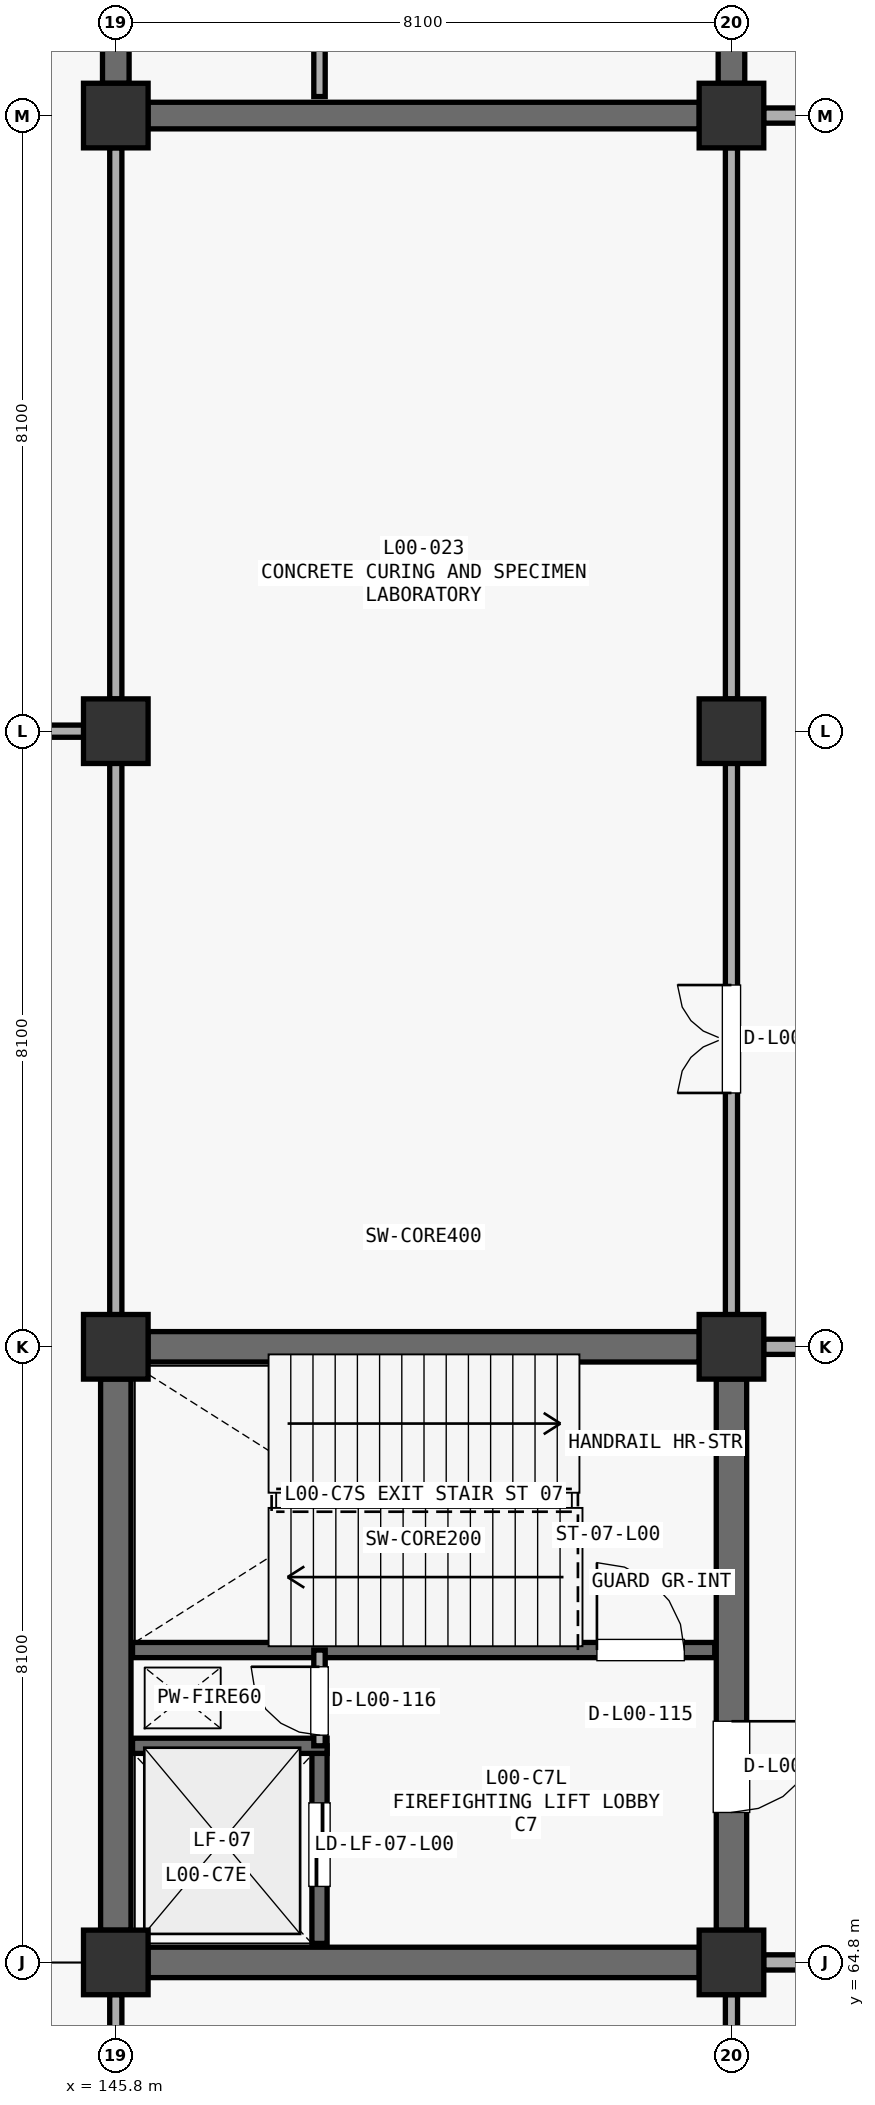
"""IFC4 building model, lengths in metres.
Left out: names, types, materials, properties, quantities, classifications, styles, units other than length and angle.
Written with IfcOpenShell. Run it as: python <this file> out.ifc"""

import sys

from ifc_helpers import new_model, si_unit, direction, frame, frame_2d, origin, origin_2d, place, context, subcontext, project, spatial, rectangle, extrude, element, fill, save


model = new_model("IFC4")
c1 = context("Model", 3, precision=1e-05, world=origin(), true_north=direction((0.0, 1.0)))
c2 = subcontext(c1, "Body", "Model", "MODEL_VIEW")
j1 = project(units=[si_unit("LENGTHUNIT", "METRE"), si_unit("PLANEANGLEUNIT", "RADIAN")], contexts=[c1])
p1 = place(None, origin())
s1 = spatial("IfcSite", under=j1, at=p1, CompositionType="ELEMENT")
p2 = place(p1, origin())
s2 = spatial("IfcBuilding", under=s1, at=p2, CompositionType="ELEMENT")
p3 = place(p2, origin())
s3 = spatial("IfcBuildingStorey", under=s2, at=p3, CompositionType="ELEMENT", Elevation=0.0)
for number, where, z_axis, x_axis in (
    (1, (145.8, 64.8, 0.0), (0.0, 0.0, 1.0), (1.0, 0.0, 0.0)),
    (2, (145.8, 72.9, 0.0), (0.0, 0.0, 1.0), (1.0, 0.0, 0.0)),
    (3, (145.8, 81.0, 0.0), (0.0, 0.0, 1.0), (1.0, 0.0, 0.0)),
    (4, (145.8, 89.1, 0.0), (0.0, 0.0, 1.0), (1.0, 0.0, 0.0)),
    (5, (153.9, 64.8, 0.0), (0.0, 0.0, 1.0), (1.0, 0.0, 0.0)),
    (6, (153.9, 72.9, 0.0), (0.0, 0.0, 1.0), (1.0, 0.0, 0.0)),
    (7, (153.9, 81.0, 0.0), (0.0, 0.0, 1.0), (1.0, 0.0, 0.0)),
    (8, (153.9, 89.1, 0.0), (0.0, 0.0, 1.0), (1.0, 0.0, 0.0)),
):
    element("IfcColumn", number, at=place(p3, frame(where, z_axis=z_axis, x_axis=x_axis)), inside=s3, PredefinedType="COLUMN", context=c2, shape_type="SweptSolid", body=[
        extrude(rectangle(XDim=0.85, YDim=0.85, at=origin_2d()), origin(), (0.0, 0.0, 1.0), 5.1),
    ])
for number, where, z_axis, x_axis in (
    (9, (146.223, 72.9, 0.0), (0.0, 0.0, 1.0), (1.0, 0.0, 0.0)),
    (10, (145.8, 65.223, 0.0), (0.0, 0.0, 1.0), (0.0, 1.0, 0.0)),
):
    element("IfcWall", number, at=place(p3, frame(where, z_axis=z_axis, x_axis=x_axis)), inside=s3, PredefinedType="SHEAR", context=c2, shape_type="SweptSolid", body=[
        extrude(rectangle(XDim=7.254, YDim=0.4, at=frame_2d((3.627, 0.0))), origin(), (0.0, 0.0, 1.0), 4.822),
    ])
p4 = place(p3, frame((153.9, 65.223, 0.0), z_axis=(0.0, 0.0, 1.0), x_axis=(0.0, 1.0, 0.0)))
e11 = element("IfcWall", 11, at=p4, inside=s3, PredefinedType="SHEAR", context=c2, shape_type="SweptSolid", body=[
    extrude(rectangle(XDim=7.254, YDim=0.4, at=frame_2d((3.627, 0.0))), origin(), (0.0, 0.0, 1.0), 4.822),
])
p5 = place(p4, frame((2.75, 0.0, 0.0), z_axis=(0.0, 0.0, 1.0), x_axis=(-1.0, 0.0, 0.0)))
e12 = element("IfcOpeningElement", 12, at=p5, cuts=e11, PredefinedType="OPENING", context=c2, shape_type="SweptSolid", body=[
    extrude(rectangle(XDim=1.2, YDim=2.2, at=frame_2d((0.6, 1.1))), frame((0.0, 0.21, 0.0), z_axis=(0.0, -1.0, 0.0), x_axis=(1.0, 0.0, 0.0)), (0.0, 0.0, 1.0), 0.42),
])
p6 = place(p3, frame((146.223, 64.8, 0.0), z_axis=(0.0, 0.0, 1.0), x_axis=(1.0, 0.0, 0.0)))
e13 = element("IfcWall", 13, at=p6, inside=s3, PredefinedType="SHEAR", context=c2, shape_type="SweptSolid", body=[
    extrude(rectangle(XDim=7.254, YDim=0.4, at=frame_2d((3.627, 0.0))), origin(), (0.0, 0.0, 1.0), 4.822),
])
p7 = place(p3, frame((146.02, 68.91, 0.0), z_axis=(0.0, 0.0, 1.0), x_axis=(1.0, 0.0, 0.0)))
e14 = element("IfcWall", 14, at=p7, inside=s3, PredefinedType="SHEAR", context=c2, shape_type="SweptSolid", body=[
    extrude(rectangle(XDim=7.66, YDim=0.2, at=frame_2d((3.83, 0.0))), origin(), (0.0, 0.0, 1.0), 4.822),
])
p8 = place(p7, frame((6.11, 0.0, 0.0)))
e15 = element("IfcOpeningElement", 15, at=p8, cuts=e14, PredefinedType="OPENING", context=c2, shape_type="SweptSolid", body=[
    extrude(rectangle(XDim=1.15, YDim=2.2, at=frame_2d((0.575, 1.1))), frame((0.0, 0.11, 0.0), z_axis=(0.0, -1.0, 0.0), x_axis=(1.0, 0.0, 0.0)), (0.0, 0.0, 1.0), 0.22),
])
p9 = place(p3, frame((148.48, 65.05, 0.0), z_axis=(0.0, 0.0, 1.0), x_axis=(0.0, 1.0, 0.0)))
e16 = element("IfcWall", 16, at=p9, inside=s3, PredefinedType="SHEAR", context=c2, shape_type="SweptSolid", body=[
    extrude(rectangle(XDim=2.6, YDim=0.2, at=frame_2d((1.3, 0.0))), origin(), (0.0, 0.0, 1.0), 4.822),
])
p10 = place(p9, frame((0.75, 0.0, 0.0)))
e17 = element("IfcOpeningElement", 17, at=p10, cuts=e16, PredefinedType="OPENING", context=c2, shape_type="SweptSolid", body=[
    extrude(rectangle(XDim=1.1, YDim=2.2, at=frame_2d((0.55, 1.1))), frame((0.0, 0.11, 0.0), z_axis=(0.0, -1.0, 0.0), x_axis=(1.0, 0.0, 0.0)), (0.0, 0.0, 1.0), 0.22),
])
p11 = place(p3, frame((146.02, 67.65, 0.0), z_axis=(0.0, 0.0, 1.0), x_axis=(1.0, 0.0, 0.0)))
e18 = element("IfcWall", 18, at=p11, inside=s3, PredefinedType="SHEAR", context=c2, shape_type="SweptSolid", body=[
    extrude(rectangle(XDim=2.56, YDim=0.2, at=frame_2d((1.28, 0.0))), origin(), (0.0, 0.0, 1.0), 4.822),
])
p12 = place(p3, frame((148.48, 67.65, 0.0), z_axis=(0.0, 0.0, 1.0), x_axis=(0.0, 1.0, 0.0)))
e19 = element("IfcWall", 19, at=p12, inside=s3, PredefinedType="PARTITIONING", context=c2, shape_type="SweptSolid", body=[
    extrude(rectangle(XDim=1.26, YDim=0.15, at=frame_2d((0.63, 0.0))), origin(), (0.0, 0.0, 1.0), 4.822),
])
p13 = place(p12, frame((0.14, 0.0, 0.0)))
e20 = element("IfcOpeningElement", 20, at=p13, cuts=e19, PredefinedType="OPENING", context=c2, shape_type="SweptSolid", body=[
    extrude(rectangle(XDim=0.9, YDim=2.15, at=frame_2d((0.45, 1.075))), frame((0.0, 0.085, 0.0), z_axis=(0.0, -1.0, 0.0), x_axis=(1.0, 0.0, 0.0)), (0.0, 0.0, 1.0), 0.17),
])
p14 = place(p3, frame((145.8, 89.523, 0.0), z_axis=(0.0, 0.0, 1.0), x_axis=(0.0, 1.0, 0.0)))
e21 = element("IfcWall", 21, at=p14, inside=s3, PredefinedType="SHEAR", context=c2, shape_type="SweptSolid", body=[
    extrude(rectangle(XDim=7.254, YDim=0.35, at=frame_2d((3.627, 0.0))), origin(), (0.0, 0.0, 1.0), 4.822),
])
p15 = place(p3, frame((153.9, 89.523, 0.0), z_axis=(0.0, 0.0, 1.0), x_axis=(0.0, 1.0, 0.0)))
e22 = element("IfcWall", 22, at=p15, inside=s3, PredefinedType="SHEAR", context=c2, shape_type="SweptSolid", body=[
    extrude(rectangle(XDim=7.254, YDim=0.35, at=frame_2d((3.627, 0.0))), origin(), (0.0, 0.0, 1.0), 4.822),
])
p16 = place(p15, frame((2.75, 0.0, 0.0), z_axis=(0.0, 0.0, 1.0), x_axis=(-1.0, 0.0, 0.0)))
e23 = element("IfcOpeningElement", 23, at=p16, cuts=e22, PredefinedType="OPENING", context=c2, shape_type="SweptSolid", body=[
    extrude(rectangle(XDim=1.2, YDim=2.2, at=frame_2d((0.6, 1.1))), frame((0.0, 0.185, 0.0), z_axis=(0.0, -1.0, 0.0), x_axis=(1.0, 0.0, 0.0)), (0.0, 0.0, 1.0), 0.37),
])
p17 = place(p3, frame((146.223, 89.1, 0.0), z_axis=(0.0, 0.0, 1.0), x_axis=(1.0, 0.0, 0.0)))
e24 = element("IfcWall", 24, at=p17, inside=s3, PredefinedType="SHEAR", context=c2, shape_type="SweptSolid", body=[
    extrude(rectangle(XDim=7.254, YDim=0.35, at=frame_2d((3.627, 0.0))), origin(), (0.0, 0.0, 1.0), 4.822),
])
p18 = place(p3, frame((148.48, 89.35, 0.0), z_axis=(0.0, 0.0, 1.0), x_axis=(0.0, 1.0, 0.0)))
e25 = element("IfcWall", 25, at=p18, inside=s3, PredefinedType="PARTITIONING", context=c2, shape_type="SweptSolid", body=[
    extrude(rectangle(XDim=2.6, YDim=0.15, at=frame_2d((1.3, 0.0))), origin(), (0.0, 0.0, 1.0), 4.822),
])
p19 = place(p18, frame((0.8, 0.0, 0.0)))
e26 = element("IfcOpeningElement", 26, at=p19, cuts=e25, PredefinedType="OPENING", context=c2, shape_type="SweptSolid", body=[
    extrude(rectangle(XDim=0.95, YDim=2.15, at=frame_2d((0.475, 1.075))), frame((0.0, 0.085, 0.0), z_axis=(0.0, -1.0, 0.0), x_axis=(1.0, 0.0, 0.0)), (0.0, 0.0, 1.0), 0.17),
])
p20 = place(p3, frame((145.8, 57.123, 0.0), z_axis=(0.0, 0.0, 1.0), x_axis=(0.0, 1.0, 0.0)))
e27 = element("IfcWall", 27, at=p20, inside=s3, PredefinedType="PARTITIONING", context=c2, shape_type="SweptSolid", body=[
    extrude(rectangle(XDim=7.254, YDim=0.16, at=frame_2d((3.627, 0.0))), origin(), (0.0, 0.0, 1.0), 3.872),
])
p21 = place(p20, frame((2.917, 0.0, 0.0)))
e28 = element("IfcOpeningElement", 28, at=p21, cuts=e27, PredefinedType="OPENING", context=c2, shape_type="SweptSolid", body=[
    extrude(rectangle(XDim=1.42, YDim=2.25, at=frame_2d((0.71, 1.125))), frame((0.0, 0.09, 0.0), z_axis=(0.0, -1.0, 0.0), x_axis=(1.0, 0.0, 0.0)), (0.0, 0.0, 1.0), 0.18),
])
p22 = place(p3, frame((145.8, 73.323, 0.0), z_axis=(0.0, 0.0, 1.0), x_axis=(0.0, 1.0, 0.0)))
e29 = element("IfcWall", 29, at=p22, inside=s3, PredefinedType="PARTITIONING", context=c2, shape_type="SweptSolid", body=[
    extrude(rectangle(XDim=7.254, YDim=0.16, at=frame_2d((3.627, 0.0))), origin(), (0.0, 0.0, 1.0), 4.172),
])
p23 = place(p3, frame((138.123, 81.0, 0.0), z_axis=(0.0, 0.0, 1.0), x_axis=(1.0, 0.0, 0.0)))
e30 = element("IfcWall", 30, at=p23, inside=s3, PredefinedType="PARTITIONING", context=c2, shape_type="SweptSolid", body=[
    extrude(rectangle(XDim=7.254, YDim=0.16, at=frame_2d((3.627, 0.0))), origin(), (0.0, 0.0, 1.0), 3.972),
])
p24 = place(p3, frame((153.9, 73.323, 0.0), z_axis=(0.0, 0.0, 1.0), x_axis=(0.0, 1.0, 0.0)))
e31 = element("IfcWall", 31, at=p24, inside=s3, PredefinedType="PARTITIONING", context=c2, shape_type="SweptSolid", body=[
    extrude(rectangle(XDim=7.254, YDim=0.16, at=frame_2d((3.627, 0.0))), origin(), (0.0, 0.0, 1.0), 3.972),
])
p25 = place(p24, frame((2.917, 0.0, 0.0)))
e32 = element("IfcOpeningElement", 32, at=p25, cuts=e31, PredefinedType="OPENING", context=c2, shape_type="SweptSolid", body=[
    extrude(rectangle(XDim=1.42, YDim=2.25, at=frame_2d((0.71, 1.125))), frame((0.0, 0.09, 0.0), z_axis=(0.0, -1.0, 0.0), x_axis=(1.0, 0.0, 0.0)), (0.0, 0.0, 1.0), 0.18),
])
p26 = place(p3, frame((153.9, 81.423, 0.0), z_axis=(0.0, 0.0, 1.0), x_axis=(0.0, 1.0, 0.0)))
e33 = element("IfcWall", 33, at=p26, inside=s3, PredefinedType="PARTITIONING", context=c2, shape_type="SweptSolid", body=[
    extrude(rectangle(XDim=7.254, YDim=0.16, at=frame_2d((3.627, 0.0))), origin(), (0.0, 0.0, 1.0), 3.872),
])
p27 = place(p3, frame((145.8, 81.423, 0.0), z_axis=(0.0, 0.0, 1.0), x_axis=(0.0, 1.0, 0.0)))
e34 = element("IfcWall", 34, at=p27, inside=s3, PredefinedType="PARTITIONING", context=c2, shape_type="SweptSolid", body=[
    extrude(rectangle(XDim=7.254, YDim=0.16, at=frame_2d((3.627, 0.0))), origin(), (0.0, 0.0, 1.0), 4.222),
])
p28 = place(p3, frame((153.9, 57.123, 0.0), z_axis=(0.0, 0.0, 1.0), x_axis=(0.0, 1.0, 0.0)))
e35 = element("IfcWall", 35, at=p28, inside=s3, PredefinedType="PARTITIONING", context=c2, shape_type="SweptSolid", body=[
    extrude(rectangle(XDim=7.254, YDim=0.16, at=frame_2d((3.627, 0.0))), origin(), (0.0, 0.0, 1.0), 4.172),
])
p29 = place(p28, frame((3.027, 0.0, 0.0)))
e36 = element("IfcOpeningElement", 36, at=p29, cuts=e35, PredefinedType="OPENING", context=c2, shape_type="SweptSolid", body=[
    extrude(rectangle(XDim=1.2, YDim=2.2, at=frame_2d((0.6, 1.1))), frame((0.0, 0.09, 0.0), z_axis=(0.0, -1.0, 0.0), x_axis=(1.0, 0.0, 0.0)), (0.0, 0.0, 1.0), 0.18),
])
p30 = place(p3, frame((154.323, 64.8, 0.0), z_axis=(0.0, 0.0, 1.0), x_axis=(1.0, 0.0, 0.0)))
e37 = element("IfcWall", 37, at=p30, inside=s3, PredefinedType="PARTITIONING", context=c2, shape_type="SweptSolid", body=[
    extrude(rectangle(XDim=7.254, YDim=0.2, at=frame_2d((3.627, 0.0))), origin(), (0.0, 0.0, 1.0), 3.972),
])
p31 = place(p30, frame((2.727, 0.0, 0.0)))
e38 = element("IfcOpeningElement", 38, at=p31, cuts=e37, PredefinedType="OPENING", context=c2, shape_type="SweptSolid", body=[
    extrude(rectangle(XDim=1.8, YDim=2.2, at=frame_2d((0.9, 1.1))), frame((0.0, 0.11, 0.0), z_axis=(0.0, -1.0, 0.0), x_axis=(1.0, 0.0, 0.0)), (0.0, 0.0, 1.0), 0.22),
])
p32 = place(p3, frame((154.323, 72.9, 0.0), z_axis=(0.0, 0.0, 1.0), x_axis=(1.0, 0.0, 0.0)))
e39 = element("IfcWall", 39, at=p32, inside=s3, PredefinedType="PARTITIONING", context=c2, shape_type="SweptSolid", body=[
    extrude(rectangle(XDim=7.254, YDim=0.2, at=frame_2d((3.627, 0.0))), origin(), (0.0, 0.0, 1.0), 3.872),
])
p33 = place(p32, frame((2.727, 0.0, 0.0)))
e40 = element("IfcOpeningElement", 40, at=p33, cuts=e39, PredefinedType="OPENING", context=c2, shape_type="SweptSolid", body=[
    extrude(rectangle(XDim=1.8, YDim=2.2, at=frame_2d((0.9, 1.1))), frame((0.0, 0.11, 0.0), z_axis=(0.0, -1.0, 0.0), x_axis=(1.0, 0.0, 0.0)), (0.0, 0.0, 1.0), 0.22),
])
p34 = place(p3, frame((154.323, 89.1, 0.0), z_axis=(0.0, 0.0, 1.0), x_axis=(1.0, 0.0, 0.0)))
e41 = element("IfcWall", 41, at=p34, inside=s3, PredefinedType="PARTITIONING", context=c2, shape_type="SweptSolid", body=[
    extrude(rectangle(XDim=7.254, YDim=0.2, at=frame_2d((3.627, 0.0))), origin(), (0.0, 0.0, 1.0), 4.172),
])
p35 = place(p34, frame((2.727, 0.0, 0.0)))
e42 = element("IfcOpeningElement", 42, at=p35, cuts=e41, PredefinedType="OPENING", context=c2, shape_type="SweptSolid", body=[
    extrude(rectangle(XDim=1.8, YDim=2.2, at=frame_2d((0.9, 1.1))), frame((0.0, 0.11, 0.0), z_axis=(0.0, -1.0, 0.0), x_axis=(1.0, 0.0, 0.0)), (0.0, 0.0, 1.0), 0.22),
])
p36 = place(p5, origin())
e43 = element("IfcDoor", 43, at=p36, inside=s3, OperationType="SINGLE_SWING_RIGHT", PredefinedType="DOOR", context=c2, shape_type="SweptSolid", body=[
    extrude(rectangle(XDim=1.2, YDim=2.2, at=frame_2d((0.6, 1.1))), frame((0.0, 0.025, 0.0), z_axis=(0.0, -1.0, 0.0), x_axis=(1.0, 0.0, 0.0)), (0.0, 0.0, 1.0), 0.05),
])
fill(e12, e43)
p37 = place(p8, origin())
e44 = element("IfcDoor", 44, at=p37, inside=s3, OperationType="SINGLE_SWING_LEFT", PredefinedType="DOOR", context=c2, shape_type="SweptSolid", body=[
    extrude(rectangle(XDim=1.15, YDim=2.2, at=frame_2d((0.575, 1.1))), frame((0.0, 0.025, 0.0), z_axis=(0.0, -1.0, 0.0), x_axis=(1.0, 0.0, 0.0)), (0.0, 0.0, 1.0), 0.05),
])
fill(e15, e44)
p38 = place(p10, origin())
e45 = element("IfcDoor", 45, at=p38, inside=s3, OperationType="SLIDING_TO_LEFT", PredefinedType="DOOR", context=c2, shape_type="SweptSolid", body=[
    extrude(rectangle(XDim=1.1, YDim=2.2, at=frame_2d((0.55, 1.1))), frame((0.0, 0.025, 0.0), z_axis=(0.0, -1.0, 0.0), x_axis=(1.0, 0.0, 0.0)), (0.0, 0.0, 1.0), 0.05),
])
fill(e17, e45)
p39 = place(p13, origin())
e46 = element("IfcDoor", 46, at=p39, inside=s3, OperationType="SINGLE_SWING_RIGHT", PredefinedType="DOOR", context=c2, shape_type="SweptSolid", body=[
    extrude(rectangle(XDim=0.9, YDim=2.15, at=frame_2d((0.45, 1.075))), frame((0.0, 0.025, 0.0), z_axis=(0.0, -1.0, 0.0), x_axis=(1.0, 0.0, 0.0)), (0.0, 0.0, 1.0), 0.05),
])
fill(e20, e46)
p40 = place(p25, origin())
e47 = element("IfcDoor", 47, at=p40, inside=s3, OperationType="DOUBLE_SWING_LEFT", PredefinedType="DOOR", context=c2, shape_type="SweptSolid", body=[
    extrude(rectangle(XDim=1.42, YDim=2.25, at=frame_2d((0.71, 1.125))), frame((0.0, 0.025, 0.0), z_axis=(0.0, -1.0, 0.0), x_axis=(1.0, 0.0, 0.0)), (0.0, 0.0, 1.0), 0.05),
])
fill(e32, e47)
save(model, sys.argv[1])
